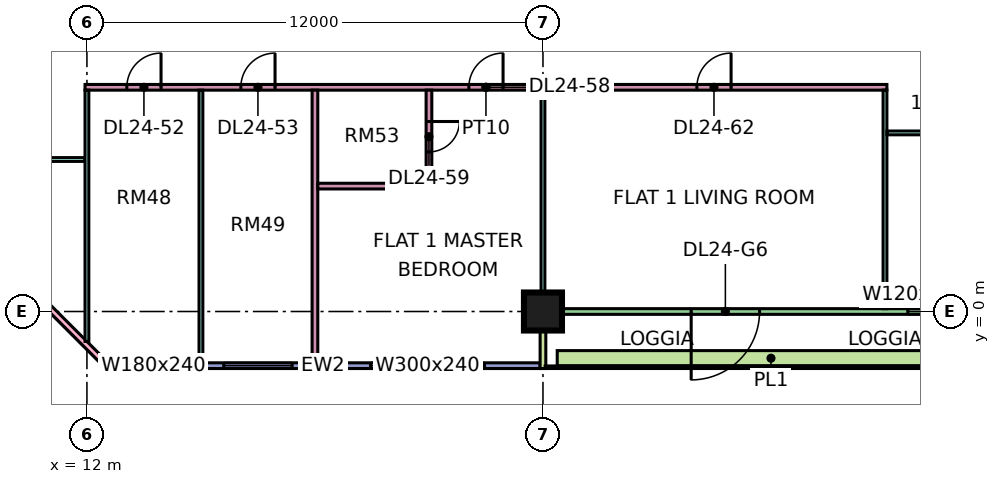
"""IFC4 building model, lengths in metres.
Left out: names, types, materials, properties, quantities, classifications, styles, units other than length and angle.
Written with IfcOpenShell. Run it as: python <this file> out.ifc"""

import sys

from ifc_helpers import new_model, si_unit, direction, frame, frame_2d, origin, origin_2d, place, context, subcontext, project, spatial, rectangle, extrude, element, fill, save


model = new_model("IFC4")
c1 = context("Model", 3, precision=1e-05, world=origin(), true_north=direction((0.0, 1.0)))
c2 = subcontext(c1, "Body", "Model", "MODEL_VIEW")
j1 = project(units=[si_unit("LENGTHUNIT", "METRE"), si_unit("PLANEANGLEUNIT", "RADIAN")], contexts=[c1])
p1 = place(None, origin())
s1 = spatial("IfcSite", under=j1, at=p1, CompositionType="ELEMENT")
p2 = place(p1, origin())
s2 = spatial("IfcBuilding", under=s1, at=p2, CompositionType="ELEMENT")
p3 = place(p2, frame((0.0, 0.0, 106.9)))
s3 = spatial("IfcBuildingStorey", under=s2, at=p3, CompositionType="ELEMENT", Elevation=106.9)
p4 = place(p3, frame((24.0, 0.0, 0.0), z_axis=(0.0, 0.0, 1.0), x_axis=(1.0, 0.0, 0.0)))
e1 = element("IfcColumn", 1, at=p4, inside=s3, PredefinedType="COLUMN", context=c2, shape_type="SweptSolid", body=[
    extrude(rectangle(XDim=1.0, YDim=1.0, at=origin_2d()), origin(), (0.0, 0.0, 1.0), 3.75),
])
p5 = place(p3, frame((-1.447, 12.553, 0.0), z_axis=(0.0, 0.0, 1.0), x_axis=(0.707106781187, -0.707106781187, 0.0)))
e2 = element("IfcWall", 2, at=p5, inside=s3, PredefinedType="SOLIDWALL", context=c2, shape_type="SweptSolid", body=[
    extrude(rectangle(XDim=19.799, YDim=0.15, at=frame_2d((9.899, 0.0))), origin(), (0.0, 0.0, 1.0), 3.35),
])
p6 = place(p5, frame((2.212, 0.0, 0.45)))
e3 = element("IfcOpeningElement", 3, at=p6, cuts=e2, PredefinedType="OPENING", context=c2, shape_type="SweptSolid", body=[
    extrude(rectangle(XDim=3.0, YDim=2.4, at=frame_2d((1.5, 1.2))), frame((0.0, 0.085, 0.0), z_axis=(0.0, -1.0, 0.0), x_axis=(1.0, 0.0, 0.0)), (0.0, 0.0, 1.0), 0.17),
])
p7 = place(p5, frame((10.216, 0.0, 0.45)))
e4 = element("IfcOpeningElement", 4, at=p7, cuts=e2, PredefinedType="OPENING", context=c2, shape_type="SweptSolid", body=[
    extrude(rectangle(XDim=3.0, YDim=2.4, at=frame_2d((1.5, 1.2))), frame((0.0, 0.085, 0.0), z_axis=(0.0, -1.0, 0.0), x_axis=(1.0, 0.0, 0.0)), (0.0, 0.0, 1.0), 0.17),
])
p8 = place(p3, frame((12.5, -1.425, 0.0), z_axis=(0.0, 0.0, 1.0), x_axis=(1.0, 0.0, 0.0)))
e5 = element("IfcWall", 5, at=p8, inside=s3, PredefinedType="SOLIDWALL", context=c2, shape_type="SweptSolid", body=[
    extrude(rectangle(XDim=11.425, YDim=0.15, at=frame_2d((5.712, 0.0))), origin(), (0.0, 0.0, 1.0), 3.35),
])
p9 = place(p8, frame((0.35, 0.0, 0.45)))
e6 = element("IfcOpeningElement", 6, at=p9, cuts=e5, PredefinedType="OPENING", context=c2, shape_type="SweptSolid", body=[
    extrude(rectangle(XDim=1.8, YDim=2.4, at=frame_2d((0.9, 1.2))), frame((0.0, 0.085, 0.0), z_axis=(0.0, -1.0, 0.0), x_axis=(1.0, 0.0, 0.0)), (0.0, 0.0, 1.0), 0.17),
])
p10 = place(p8, frame((3.1, 0.0, 0.45)))
e7 = element("IfcOpeningElement", 7, at=p10, cuts=e5, PredefinedType="OPENING", context=c2, shape_type="SweptSolid", body=[
    extrude(rectangle(XDim=1.8, YDim=2.4, at=frame_2d((0.9, 1.2))), frame((0.0, 0.085, 0.0), z_axis=(0.0, -1.0, 0.0), x_axis=(1.0, 0.0, 0.0)), (0.0, 0.0, 1.0), 0.17),
])
p11 = place(p8, frame((6.962, 0.0, 0.45)))
e8 = element("IfcOpeningElement", 8, at=p11, cuts=e5, PredefinedType="OPENING", context=c2, shape_type="SweptSolid", body=[
    extrude(rectangle(XDim=3.0, YDim=2.4, at=frame_2d((1.5, 1.2))), frame((0.0, 0.085, 0.0), z_axis=(0.0, -1.0, 0.0), x_axis=(1.0, 0.0, 0.0)), (0.0, 0.0, 1.0), 0.17),
])
p12 = place(p3, frame((24.075, 0.0, 0.0), z_axis=(0.0, 0.0, 1.0), x_axis=(1.0, 0.0, 0.0)))
e9 = element("IfcWall", 9, at=p12, inside=s3, PredefinedType="SOLIDWALL", context=c2, shape_type="SweptSolid", body=[
    extrude(rectangle(XDim=11.85, YDim=0.15, at=frame_2d((5.925, 0.0))), origin(), (0.0, 0.0, 1.0), 3.35),
])
p13 = place(p12, frame((3.825, 0.0, 0.0)))
e10 = element("IfcOpeningElement", 10, at=p13, cuts=e9, PredefinedType="OPENING", context=c2, shape_type="SweptSolid", body=[
    extrude(rectangle(XDim=1.8, YDim=2.4, at=frame_2d((0.9, 1.2))), frame((0.0, 0.085, 0.0), z_axis=(0.0, -1.0, 0.0), x_axis=(1.0, 0.0, 0.0)), (0.0, 0.0, 1.0), 0.17),
])
p14 = place(p12, frame((9.525, 0.0, 0.45)))
e11 = element("IfcOpeningElement", 11, at=p14, cuts=e9, PredefinedType="OPENING", context=c2, shape_type="SweptSolid", body=[
    extrude(rectangle(XDim=1.2, YDim=2.4, at=frame_2d((0.6, 1.2))), frame((0.0, 0.085, 0.0), z_axis=(0.0, -1.0, 0.0), x_axis=(1.0, 0.0, 0.0)), (0.0, 0.0, 1.0), 0.17),
])
p15 = place(p3, frame((24.0, -1.5, 0.0), z_axis=(0.0, 0.0, 1.0), x_axis=(0.0, 1.0, 0.0)))
e12 = element("IfcWall", 12, at=p15, inside=s3, PredefinedType="SOLIDWALL", context=c2, shape_type="SweptSolid", body=[
    extrude(rectangle(XDim=1.5, YDim=0.15, at=frame_2d((0.75, 0.0))), origin(), (0.0, 0.0, 1.0), 3.35),
])
p16 = place(p3, frame((24.375, -1.229, 0.0), z_axis=(0.0, 0.0, 1.0), x_axis=(1.0, 0.0, 0.0)))
e13 = element("IfcWall", 13, at=p16, inside=s3, PredefinedType="SOLIDWALL", context=c2, shape_type="SweptSolid", body=[
    extrude(rectangle(XDim=11.25, YDim=0.4, at=frame_2d((5.625, 0.0))), origin(), (0.0, 0.0, 1.0), 0.7),
])
p17 = place(p3, frame((9.05, 4.0, 0.0), z_axis=(0.0, 0.0, 1.0), x_axis=(1.0, 0.0, 0.0)))
e14 = element("IfcWall", 14, at=p17, inside=s3, PredefinedType="PARTITIONING", context=c2, shape_type="SweptSolid", body=[
    extrude(rectangle(XDim=2.9, YDim=0.1, at=frame_2d((1.45, 0.0))), origin(), (0.0, 0.0, 1.0), 3.35),
])
p18 = place(p3, frame((11.95, 5.9, 0.0), z_axis=(0.0, 0.0, 1.0), x_axis=(1.0, 0.0, 0.0)))
e15 = element("IfcWall", 15, at=p18, inside=s3, PredefinedType="PARTITIONING", context=c2, shape_type="SweptSolid", body=[
    extrude(rectangle(XDim=21.1, YDim=0.15, at=frame_2d((10.55, 0.0))), origin(), (0.0, 0.0, 1.0), 3.35),
])
p19 = place(p18, frame((1.1, 0.0, 0.0)))
e16 = element("IfcOpeningElement", 16, at=p19, cuts=e15, PredefinedType="OPENING", context=c2, shape_type="SweptSolid", body=[
    extrude(rectangle(XDim=0.9, YDim=2.1, at=frame_2d((0.45, 1.05))), frame((0.0, 0.085, 0.0), z_axis=(0.0, -1.0, 0.0), x_axis=(1.0, 0.0, 0.0)), (0.0, 0.0, 1.0), 0.17),
])
p20 = place(p18, frame((4.1, 0.0, 0.0)))
e17 = element("IfcOpeningElement", 17, at=p20, cuts=e15, PredefinedType="OPENING", context=c2, shape_type="SweptSolid", body=[
    extrude(rectangle(XDim=0.9, YDim=2.1, at=frame_2d((0.45, 1.05))), frame((0.0, 0.085, 0.0), z_axis=(0.0, -1.0, 0.0), x_axis=(1.0, 0.0, 0.0)), (0.0, 0.0, 1.0), 0.17),
])
p21 = place(p18, frame((10.1, 0.0, 0.0)))
e18 = element("IfcOpeningElement", 18, at=p21, cuts=e15, PredefinedType="OPENING", context=c2, shape_type="SweptSolid", body=[
    extrude(rectangle(XDim=0.9, YDim=2.1, at=frame_2d((0.45, 1.05))), frame((0.0, 0.085, 0.0), z_axis=(0.0, -1.0, 0.0), x_axis=(1.0, 0.0, 0.0)), (0.0, 0.0, 1.0), 0.17),
])
p22 = place(p18, frame((16.1, 0.0, 0.0)))
e19 = element("IfcOpeningElement", 19, at=p22, cuts=e15, PredefinedType="OPENING", context=c2, shape_type="SweptSolid", body=[
    extrude(rectangle(XDim=0.9, YDim=2.1, at=frame_2d((0.45, 1.05))), frame((0.0, 0.085, 0.0), z_axis=(0.0, -1.0, 0.0), x_axis=(1.0, 0.0, 0.0)), (0.0, 0.0, 1.0), 0.17),
])
p23 = place(p3, frame((12.0, -0.788, 0.0), z_axis=(0.0, 0.0, 1.0), x_axis=(0.0, 1.0, 0.0)))
e20 = element("IfcWall", 20, at=p23, inside=s3, PredefinedType="PARTITIONING", context=c2, shape_type="SweptSolid", body=[
    extrude(rectangle(XDim=6.613, YDim=0.1, at=frame_2d((3.306, 0.0))), origin(), (0.0, 0.0, 1.0), 3.35),
])
p24 = place(p3, frame((15.0, -1.351, 0.0), z_axis=(0.0, 0.0, 1.0), x_axis=(0.0, 1.0, 0.0)))
e21 = element("IfcWall", 21, at=p24, inside=s3, PredefinedType="PARTITIONING", context=c2, shape_type="SweptSolid", body=[
    extrude(rectangle(XDim=7.176, YDim=0.1, at=frame_2d((3.588, 0.0))), origin(), (0.0, 0.0, 1.0), 3.35),
])
p25 = place(p3, frame((18.0, -1.351, 0.0), z_axis=(0.0, 0.0, 1.0), x_axis=(0.0, 1.0, 0.0)))
e22 = element("IfcWall", 22, at=p25, inside=s3, PredefinedType="PARTITIONING", context=c2, shape_type="SweptSolid", body=[
    extrude(rectangle(XDim=7.176, YDim=0.15, at=frame_2d((3.588, 0.0))), origin(), (0.0, 0.0, 1.0), 3.35),
])
p26 = place(p3, frame((18.075, 3.3, 0.0), z_axis=(0.0, 0.0, 1.0), x_axis=(1.0, 0.0, 0.0)))
e23 = element("IfcWall", 23, at=p26, inside=s3, PredefinedType="PARTITIONING", context=c2, shape_type="SweptSolid", body=[
    extrude(rectangle(XDim=3.0, YDim=0.15, at=frame_2d((1.5, 0.0))), origin(), (0.0, 0.0, 1.0), 3.35),
])
p27 = place(p3, frame((21.0, 3.375, 0.0), z_axis=(0.0, 0.0, 1.0), x_axis=(0.0, 1.0, 0.0)))
e24 = element("IfcWall", 24, at=p27, inside=s3, PredefinedType="PARTITIONING", context=c2, shape_type="SweptSolid", body=[
    extrude(rectangle(XDim=2.45, YDim=0.15, at=frame_2d((1.225, 0.0))), origin(), (0.0, 0.0, 1.0), 3.35),
])
p28 = place(p27, frame((0.825, 0.0, 0.0)))
e25 = element("IfcOpeningElement", 25, at=p28, cuts=e24, PredefinedType="OPENING", context=c2, shape_type="SweptSolid", body=[
    extrude(rectangle(XDim=0.8, YDim=2.1, at=frame_2d((0.4, 1.05))), frame((0.0, 0.085, 0.0), z_axis=(0.0, -1.0, 0.0), x_axis=(1.0, 0.0, 0.0)), (0.0, 0.0, 1.0), 0.17),
])
p29 = place(p3, frame((24.0, 0.0, 0.0), z_axis=(0.0, 0.0, 1.0), x_axis=(0.0, 1.0, 0.0)))
e26 = element("IfcWall", 26, at=p29, inside=s3, PredefinedType="PARTITIONING", context=c2, shape_type="SweptSolid", body=[
    extrude(rectangle(XDim=5.825, YDim=0.1, at=frame_2d((2.913, 0.0))), origin(), (0.0, 0.0, 1.0), 3.35),
])
p30 = place(p3, frame((33.0, 0.074, 0.0), z_axis=(0.0, 0.0, 1.0), x_axis=(0.0, 1.0, 0.0)))
e27 = element("IfcWall", 27, at=p30, inside=s3, PredefinedType="PARTITIONING", context=c2, shape_type="SweptSolid", body=[
    extrude(rectangle(XDim=5.751, YDim=0.1, at=frame_2d((2.875, 0.0))), origin(), (0.0, 0.0, 1.0), 3.35),
])
p31 = place(p3, frame((33.05, 4.7, 0.0), z_axis=(0.0, 0.0, 1.0), x_axis=(1.0, 0.0, 0.0)))
e28 = element("IfcWall", 28, at=p31, inside=s3, PredefinedType="PARTITIONING", context=c2, shape_type="SweptSolid", body=[
    extrude(rectangle(XDim=14.85, YDim=0.1, at=frame_2d((7.425, 0.0))), origin(), (0.0, 0.0, 1.0), 3.35),
])
p32 = place(p31, frame((10.0, 0.0, 0.0)))
e29 = element("IfcOpeningElement", 29, at=p32, cuts=e28, PredefinedType="OPENING", context=c2, shape_type="SweptSolid", body=[
    extrude(rectangle(XDim=0.9, YDim=2.1, at=frame_2d((0.45, 1.05))), frame((0.0, 0.06, 0.0), z_axis=(0.0, -1.0, 0.0), x_axis=(1.0, 0.0, 0.0)), (0.0, 0.0, 1.0), 0.12),
])
p33 = place(p31, frame((13.0, 0.0, 0.0)))
e30 = element("IfcOpeningElement", 30, at=p33, cuts=e28, PredefinedType="OPENING", context=c2, shape_type="SweptSolid", body=[
    extrude(rectangle(XDim=0.9, YDim=2.1, at=frame_2d((0.45, 1.05))), frame((0.0, 0.06, 0.0), z_axis=(0.0, -1.0, 0.0), x_axis=(1.0, 0.0, 0.0)), (0.0, 0.0, 1.0), 0.12),
])
p34 = place(p31, frame((4.0, 0.0, 0.0)))
e31 = element("IfcOpeningElement", 31, at=p34, cuts=e28, PredefinedType="OPENING", context=c2, shape_type="SweptSolid", body=[
    extrude(rectangle(XDim=0.9, YDim=2.1, at=frame_2d((0.45, 1.05))), frame((0.0, 0.06, 0.0), z_axis=(0.0, -1.0, 0.0), x_axis=(1.0, 0.0, 0.0)), (0.0, 0.0, 1.0), 0.12),
])
p35 = place(p9, origin())
e32 = element("IfcWindow", 32, at=p35, inside=s3, PartitioningType="SINGLE_PANEL", PredefinedType="WINDOW", context=c2, shape_type="SweptSolid", body=[
    extrude(rectangle(XDim=1.8, YDim=2.4, at=frame_2d((0.9, 1.2))), frame((0.0, 0.03, 0.0), z_axis=(0.0, -1.0, 0.0), x_axis=(1.0, 0.0, 0.0)), (0.0, 0.0, 1.0), 0.06),
])
fill(e6, e32)
p36 = place(p10, origin())
e33 = element("IfcWindow", 33, at=p36, inside=s3, PartitioningType="SINGLE_PANEL", PredefinedType="WINDOW", context=c2, shape_type="SweptSolid", body=[
    extrude(rectangle(XDim=1.8, YDim=2.4, at=frame_2d((0.9, 1.2))), frame((0.0, 0.03, 0.0), z_axis=(0.0, -1.0, 0.0), x_axis=(1.0, 0.0, 0.0)), (0.0, 0.0, 1.0), 0.06),
])
fill(e7, e33)
p37 = place(p11, origin())
e34 = element("IfcWindow", 34, at=p37, inside=s3, PartitioningType="SINGLE_PANEL", PredefinedType="WINDOW", context=c2, shape_type="SweptSolid", body=[
    extrude(rectangle(XDim=3.0, YDim=2.4, at=frame_2d((1.5, 1.2))), frame((0.0, 0.03, 0.0), z_axis=(0.0, -1.0, 0.0), x_axis=(1.0, 0.0, 0.0)), (0.0, 0.0, 1.0), 0.06),
])
fill(e8, e34)
p38 = place(p13, frame((1.8, 0.0, 0.0), z_axis=(0.0, 0.0, 1.0), x_axis=(-1.0, 0.0, 0.0)))
e35 = element("IfcDoor", 35, at=p38, inside=s3, OperationType="DOUBLE_DOOR_SINGLE_SWING", PredefinedType="DOOR", context=c2, shape_type="SweptSolid", body=[
    extrude(rectangle(XDim=1.8, YDim=2.4, at=frame_2d((0.9, 1.2))), frame((0.0, 0.025, 0.0), z_axis=(0.0, -1.0, 0.0), x_axis=(1.0, 0.0, 0.0)), (0.0, 0.0, 1.0), 0.05),
])
fill(e10, e35)
p39 = place(p14, origin())
e36 = element("IfcWindow", 36, at=p39, inside=s3, PartitioningType="SINGLE_PANEL", PredefinedType="WINDOW", context=c2, shape_type="SweptSolid", body=[
    extrude(rectangle(XDim=1.2, YDim=2.4, at=frame_2d((0.6, 1.2))), frame((0.0, 0.03, 0.0), z_axis=(0.0, -1.0, 0.0), x_axis=(1.0, 0.0, 0.0)), (0.0, 0.0, 1.0), 0.06),
])
fill(e11, e36)
p40 = place(p19, frame((0.9, 0.0, 0.0), z_axis=(0.0, 0.0, 1.0), x_axis=(-1.0, 0.0, 0.0)))
e37 = element("IfcDoor", 37, at=p40, inside=s3, OperationType="SINGLE_SWING_RIGHT", PredefinedType="DOOR", context=c2, shape_type="SweptSolid", body=[
    extrude(rectangle(XDim=0.9, YDim=2.1, at=frame_2d((0.45, 1.05))), frame((0.0, 0.025, 0.0), z_axis=(0.0, -1.0, 0.0), x_axis=(1.0, 0.0, 0.0)), (0.0, 0.0, 1.0), 0.05),
])
fill(e16, e37)
p41 = place(p20, frame((0.9, 0.0, 0.0), z_axis=(0.0, 0.0, 1.0), x_axis=(-1.0, 0.0, 0.0)))
e38 = element("IfcDoor", 38, at=p41, inside=s3, OperationType="SINGLE_SWING_RIGHT", PredefinedType="DOOR", context=c2, shape_type="SweptSolid", body=[
    extrude(rectangle(XDim=0.9, YDim=2.1, at=frame_2d((0.45, 1.05))), frame((0.0, 0.025, 0.0), z_axis=(0.0, -1.0, 0.0), x_axis=(1.0, 0.0, 0.0)), (0.0, 0.0, 1.0), 0.05),
])
fill(e17, e38)
p42 = place(p21, frame((0.9, 0.0, 0.0), z_axis=(0.0, 0.0, 1.0), x_axis=(-1.0, 0.0, 0.0)))
e39 = element("IfcDoor", 39, at=p42, inside=s3, OperationType="SINGLE_SWING_RIGHT", PredefinedType="DOOR", context=c2, shape_type="SweptSolid", body=[
    extrude(rectangle(XDim=0.9, YDim=2.1, at=frame_2d((0.45, 1.05))), frame((0.0, 0.025, 0.0), z_axis=(0.0, -1.0, 0.0), x_axis=(1.0, 0.0, 0.0)), (0.0, 0.0, 1.0), 0.05),
])
fill(e18, e39)
p43 = place(p28, origin())
e40 = element("IfcDoor", 40, at=p43, inside=s3, OperationType="SINGLE_SWING_RIGHT", PredefinedType="DOOR", context=c2, shape_type="SweptSolid", body=[
    extrude(rectangle(XDim=0.8, YDim=2.1, at=frame_2d((0.4, 1.05))), frame((0.0, 0.025, 0.0), z_axis=(0.0, -1.0, 0.0), x_axis=(1.0, 0.0, 0.0)), (0.0, 0.0, 1.0), 0.05),
])
fill(e25, e40)
p44 = place(p22, frame((0.9, 0.0, 0.0), z_axis=(0.0, 0.0, 1.0), x_axis=(-1.0, 0.0, 0.0)))
e41 = element("IfcDoor", 41, at=p44, inside=s3, OperationType="SINGLE_SWING_RIGHT", PredefinedType="DOOR", context=c2, shape_type="SweptSolid", body=[
    extrude(rectangle(XDim=0.9, YDim=2.1, at=frame_2d((0.45, 1.05))), frame((0.0, 0.025, 0.0), z_axis=(0.0, -1.0, 0.0), x_axis=(1.0, 0.0, 0.0)), (0.0, 0.0, 1.0), 0.05),
])
fill(e19, e41)
save(model, sys.argv[1])
